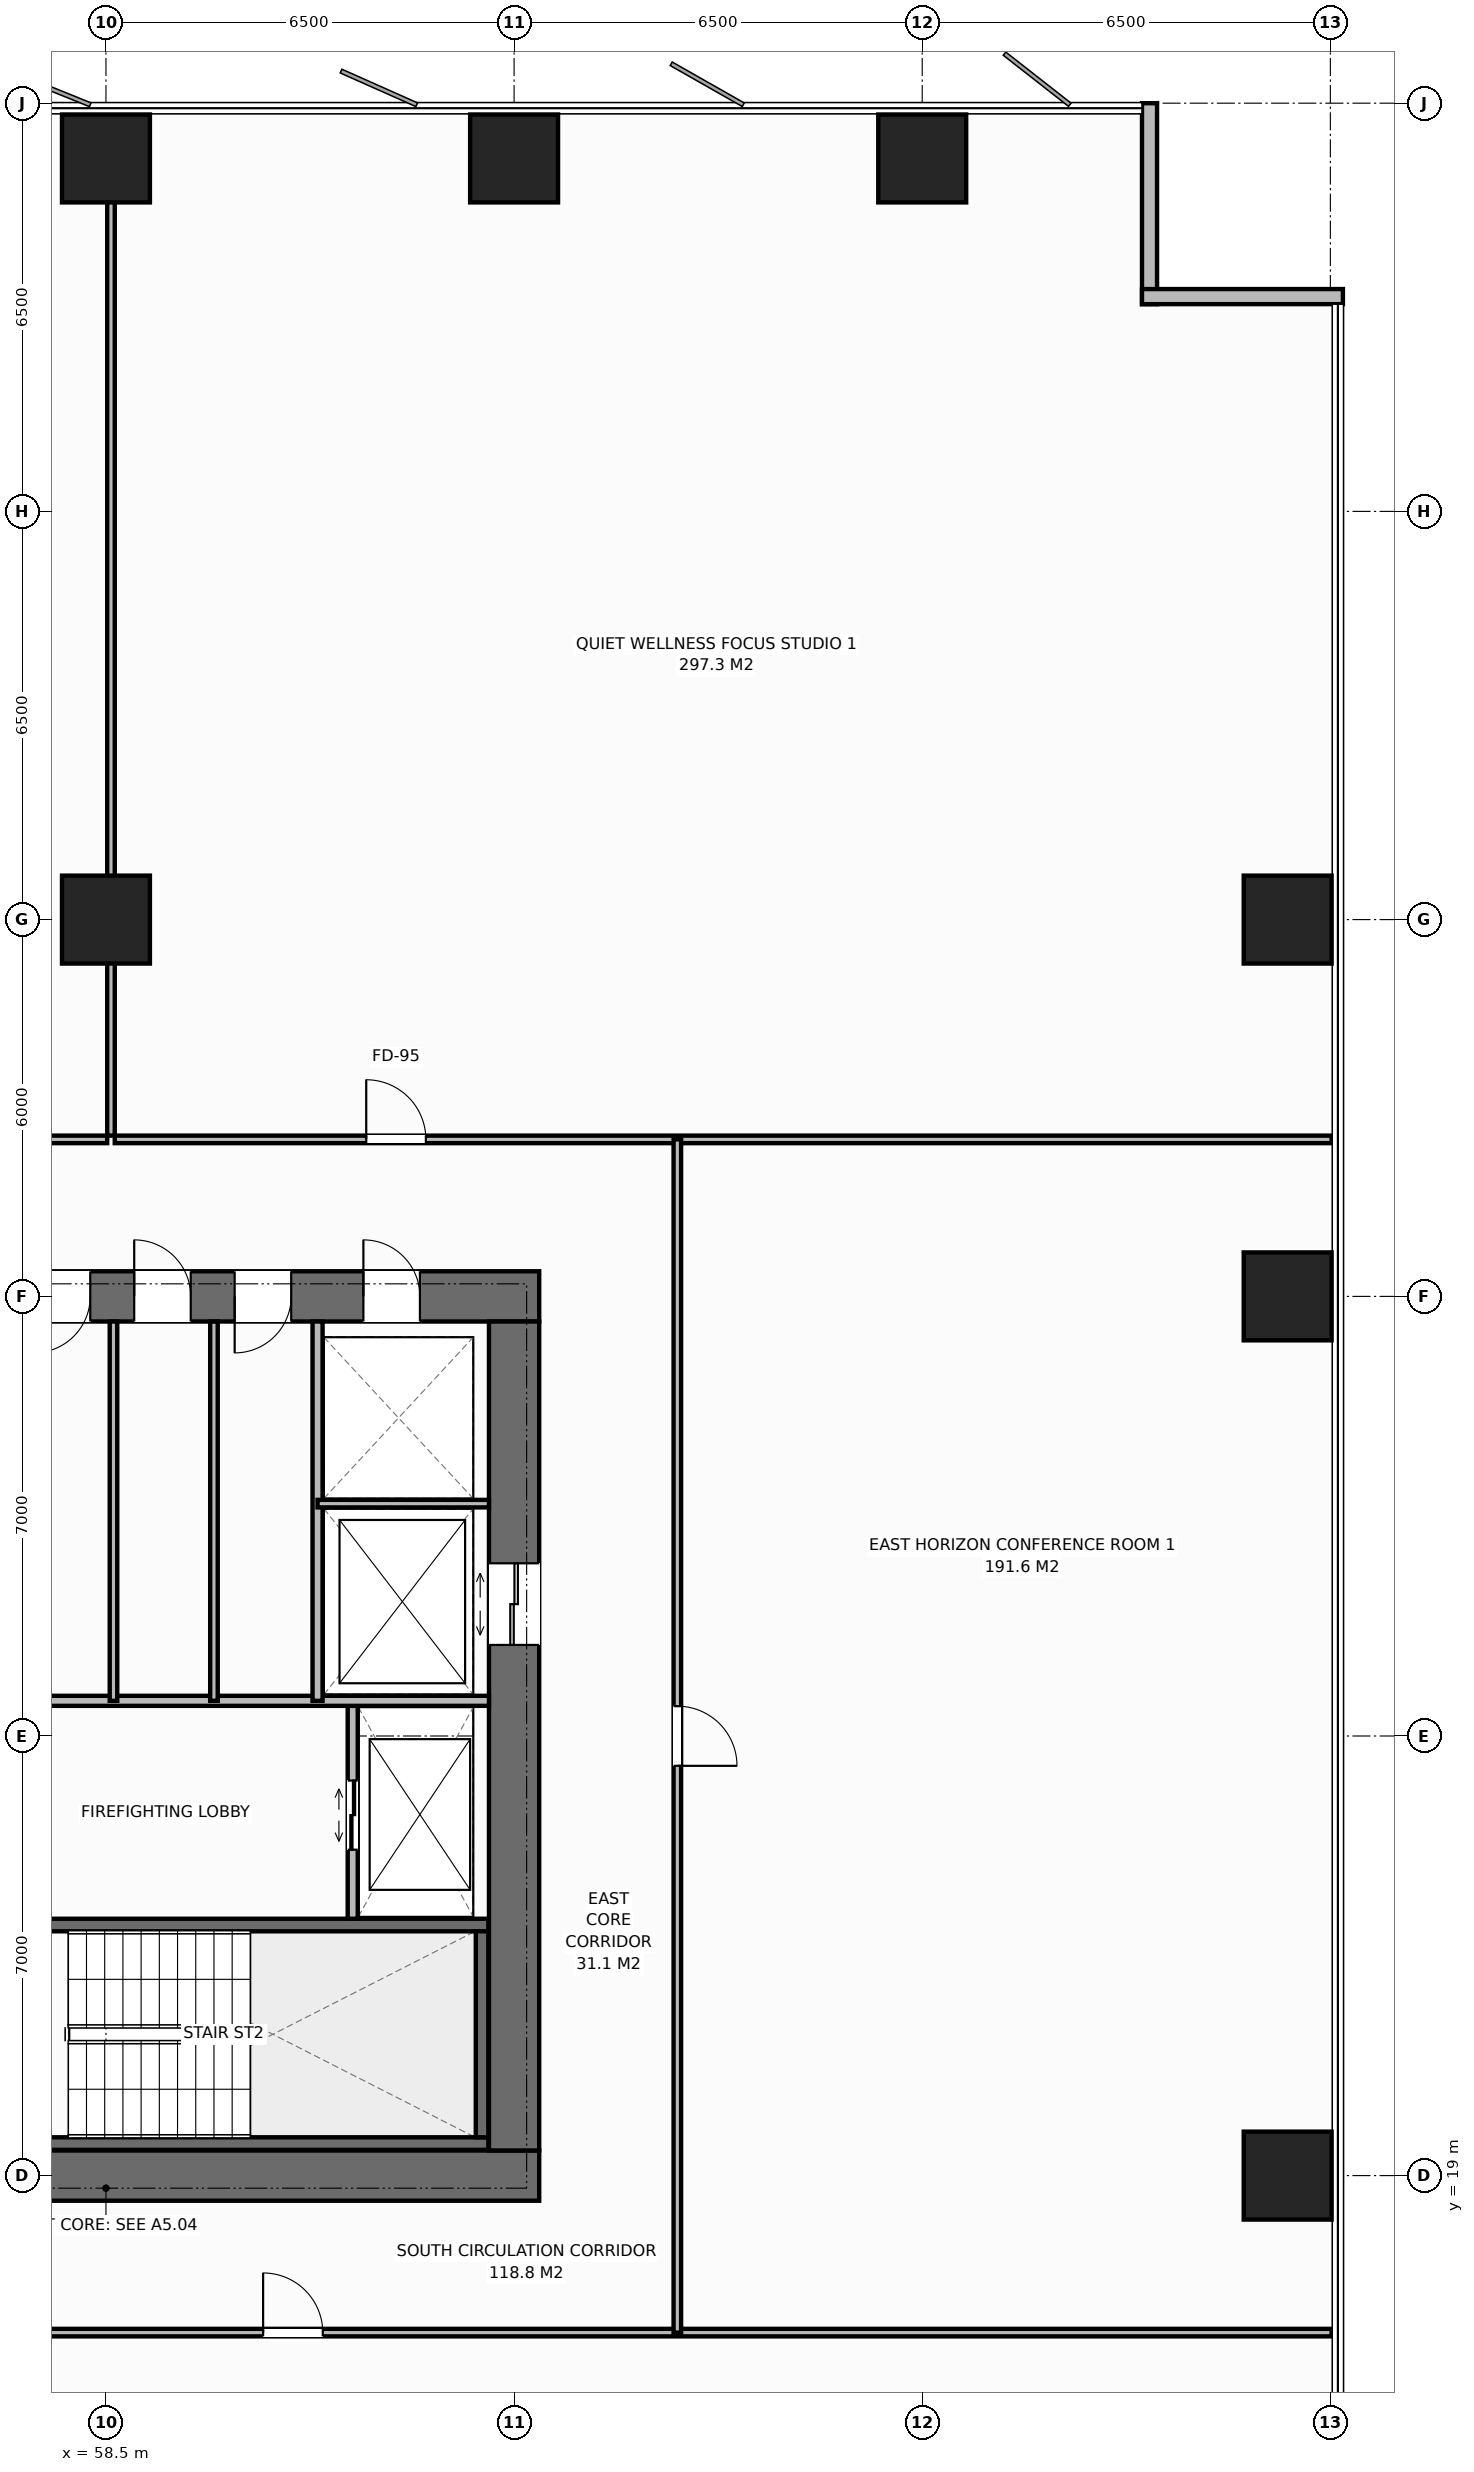
"""IFC4 building model, lengths in metres.
Left out: names, types, materials, properties, quantities, classifications, styles, units other than length and angle.
Written with IfcOpenShell. Run it as: python <this file> out.ifc"""

import sys

from ifc_helpers import new_model, si_unit, direction, frame, frame_2d, origin, origin_2d, place, context, subcontext, project, spatial, rectangle, extrude, element, fill, save


model = new_model("IFC4")
c1 = context("Model", 3, precision=1e-05, world=origin(), true_north=direction((0.0, 1.0)))
c2 = subcontext(c1, "Body", "Model", "MODEL_VIEW")
j1 = project(units=[si_unit("LENGTHUNIT", "METRE"), si_unit("PLANEANGLEUNIT", "RADIAN")], contexts=[c1])
p1 = place(None, origin())
s1 = spatial("IfcSite", under=j1, at=p1, CompositionType="ELEMENT")
p2 = place(p1, origin())
s2 = spatial("IfcBuilding", under=s1, at=p2, CompositionType="ELEMENT")
p3 = place(p2, frame((0.0, 0.0, 43.0)))
s3 = spatial("IfcBuildingStorey", under=s2, at=p3, CompositionType="ELEMENT", Elevation=43.0)
p4 = place(p3, frame((51.6, 19.0, 0.0), z_axis=(0.0, 0.0, 1.0), x_axis=(1.0, 0.0, 0.0)))
e1 = element("IfcWall", 1, at=p4, inside=s3, PredefinedType="SHEAR", context=c2, shape_type="SweptSolid", body=[
    extrude(rectangle(XDim=13.8, YDim=0.8, at=frame_2d((6.9, 0.0))), origin(), (0.0, 0.0, 1.0), 3.8),
])
p5 = place(p4, frame((3.12, 0.0, 0.0)))
e2 = element("IfcOpeningElement", 2, at=p5, cuts=e1, PredefinedType="OPENING", context=c2, shape_type="SweptSolid", body=[
    extrude(rectangle(XDim=1.4, YDim=2.2, at=frame_2d((0.7, 1.1))), frame((0.0, 0.41, 0.0), z_axis=(0.0, -1.0, 0.0), x_axis=(1.0, 0.0, 0.0)), (0.0, 0.0, 1.0), 0.82),
])
p6 = place(p3, frame((51.6, 33.0, 0.0), z_axis=(0.0, 0.0, 1.0), x_axis=(1.0, 0.0, 0.0)))
e3 = element("IfcWall", 3, at=p6, inside=s3, PredefinedType="SHEAR", context=c2, shape_type="SweptSolid", body=[
    extrude(rectangle(XDim=13.8, YDim=0.8, at=frame_2d((6.9, 0.0))), origin(), (0.0, 0.0, 1.0), 3.8),
])
p7 = place(p6, frame((3.12, 0.0, 0.0)))
e4 = element("IfcOpeningElement", 4, at=p7, cuts=e3, PredefinedType="OPENING", context=c2, shape_type="SweptSolid", body=[
    extrude(rectangle(XDim=1.4, YDim=2.2, at=frame_2d((0.7, 1.1))), frame((0.0, 0.41, 0.0), z_axis=(0.0, -1.0, 0.0), x_axis=(1.0, 0.0, 0.0)), (0.0, 0.0, 1.0), 0.82),
])
p8 = place(p6, frame((11.0, 0.0, 0.0)))
e5 = element("IfcOpeningElement", 5, at=p8, cuts=e3, PredefinedType="OPENING", context=c2, shape_type="SweptSolid", body=[
    extrude(rectangle(XDim=0.9, YDim=2.15, at=frame_2d((0.45, 1.075))), frame((0.0, 0.41, 0.0), z_axis=(0.0, -1.0, 0.0), x_axis=(1.0, 0.0, 0.0)), (0.0, 0.0, 1.0), 0.82),
])
p9 = place(p6, frame((5.75, 0.0, 0.0)))
e6 = element("IfcOpeningElement", 6, at=p9, cuts=e3, PredefinedType="OPENING", context=c2, shape_type="SweptSolid", body=[
    extrude(rectangle(XDim=0.9, YDim=2.15, at=frame_2d((0.45, 1.075))), frame((0.0, 0.41, 0.0), z_axis=(0.0, -1.0, 0.0), x_axis=(1.0, 0.0, 0.0)), (0.0, 0.0, 1.0), 0.82),
])
p10 = place(p6, frame((7.35, 0.0, 0.0)))
e7 = element("IfcOpeningElement", 7, at=p10, cuts=e3, PredefinedType="OPENING", context=c2, shape_type="SweptSolid", body=[
    extrude(rectangle(XDim=0.9, YDim=2.15, at=frame_2d((0.45, 1.075))), frame((0.0, 0.41, 0.0), z_axis=(0.0, -1.0, 0.0), x_axis=(1.0, 0.0, 0.0)), (0.0, 0.0, 1.0), 0.82),
])
p11 = place(p6, frame((8.95, 0.0, 0.0)))
e8 = element("IfcOpeningElement", 8, at=p11, cuts=e3, PredefinedType="OPENING", context=c2, shape_type="SweptSolid", body=[
    extrude(rectangle(XDim=0.9, YDim=2.15, at=frame_2d((0.45, 1.075))), frame((0.0, 0.41, 0.0), z_axis=(0.0, -1.0, 0.0), x_axis=(1.0, 0.0, 0.0)), (0.0, 0.0, 1.0), 0.82),
])
p12 = place(p3, frame((65.0, 19.4, 0.0), z_axis=(0.0, 0.0, 1.0), x_axis=(0.0, 1.0, 0.0)))
e9 = element("IfcWall", 9, at=p12, inside=s3, PredefinedType="SHEAR", context=c2, shape_type="SweptSolid", body=[
    extrude(rectangle(XDim=13.2, YDim=0.8, at=frame_2d((6.6, 0.0))), origin(), (0.0, 0.0, 1.0), 3.8),
])
p13 = place(p12, frame((8.05, 0.0, 0.0)))
e10 = element("IfcOpeningElement", 10, at=p13, cuts=e9, PredefinedType="OPENING", context=c2, shape_type="SweptSolid", body=[
    extrude(rectangle(XDim=1.3, YDim=2.2, at=frame_2d((0.65, 1.1))), frame((0.0, 0.41, 0.0), z_axis=(0.0, -1.0, 0.0), x_axis=(1.0, 0.0, 0.0)), (0.0, 0.0, 1.0), 0.82),
])
p14 = place(p3, frame((56.16, 19.51, 0.0), z_axis=(0.0, 0.0, 1.0), x_axis=(1.0, 0.0, 0.0)))
e11 = element("IfcWall", 11, at=p14, inside=s3, PredefinedType="SHEAR", context=c2, shape_type="SweptSolid", body=[
    extrude(rectangle(XDim=8.43, YDim=0.2, at=frame_2d((4.215, 0.0))), origin(), (0.0, 0.0, 1.0), 3.8),
])
p15 = place(p3, frame((56.16, 22.99, 0.0), z_axis=(0.0, 0.0, 1.0), x_axis=(1.0, 0.0, 0.0)))
e12 = element("IfcWall", 12, at=p15, inside=s3, PredefinedType="SHEAR", context=c2, shape_type="SweptSolid", body=[
    extrude(rectangle(XDim=8.43, YDim=0.2, at=frame_2d((4.215, 0.0))), origin(), (0.0, 0.0, 1.0), 3.8),
])
p16 = place(p15, frame((0.45, 0.0, 0.0)))
e13 = element("IfcOpeningElement", 13, at=p16, cuts=e12, PredefinedType="OPENING", context=c2, shape_type="SweptSolid", body=[
    extrude(rectangle(XDim=1.0, YDim=2.15, at=frame_2d((0.5, 1.075))), frame((0.0, 0.11, 0.0), z_axis=(0.0, -1.0, 0.0), x_axis=(1.0, 0.0, 0.0)), (0.0, 0.0, 1.0), 0.22),
])
p17 = place(p3, frame((64.49, 19.61, 0.0), z_axis=(0.0, 0.0, 1.0), x_axis=(0.0, 1.0, 0.0)))
e14 = element("IfcWall", 14, at=p17, inside=s3, PredefinedType="SHEAR", context=c2, shape_type="SweptSolid", body=[
    extrude(rectangle(XDim=3.28, YDim=0.2, at=frame_2d((1.64, 0.0))), origin(), (0.0, 0.0, 1.0), 3.8),
])
for number, where, z_axis, x_axis in (
    (15, (58.5, 39.0, 0.0), (0.0, 0.0, 1.0), (1.0, 0.0, 0.0)),
    (16, (58.5, 51.12, 0.0), (0.0, 0.0, 1.0), (1.0, 0.0, 0.0)),
    (17, (65.0, 51.12, 0.0), (0.0, 0.0, 1.0), (1.0, 0.0, 0.0)),
    (18, (71.5, 51.12, 0.0), (0.0, 0.0, 1.0), (1.0, 0.0, 0.0)),
    (19, (77.32, 19.0, 0.0), (0.0, 0.0, 1.0), (1.0, 0.0, 0.0)),
    (20, (77.32, 33.0, 0.0), (0.0, 0.0, 1.0), (1.0, 0.0, 0.0)),
    (21, (77.32, 39.0, 0.0), (0.0, 0.0, 1.0), (1.0, 0.0, 0.0)),
):
    element("IfcColumn", number, at=place(p3, frame(where, z_axis=z_axis, x_axis=x_axis)), inside=s3, PredefinedType="COLUMN", context=c2, shape_type="SweptSolid", body=[
        extrude(rectangle(XDim=1.4, YDim=1.4, at=origin_2d()), origin(), (0.0, 0.0, 1.0), 3.8),
    ])
for number, where, z_axis, x_axis in (
    (22, (75.12, 52.0, 0.0), (0.0, 0.0, 1.0), (0.0, -1.0, 0.0)),
    (23, (75.0, 48.92, 0.0), (0.0, 0.0, 1.0), (1.0, 0.0, 0.0)),
):
    element("IfcWall", number, at=place(p3, frame(where, z_axis=z_axis, x_axis=x_axis)), inside=s3, PredefinedType="STANDARD", context=c2, shape_type="SweptSolid", body=[
        extrude(rectangle(XDim=3.2, YDim=0.24, at=frame_2d((1.6, 0.0))), origin(), (0.0, 0.0, 1.0), 3.55),
    ])
p18 = place(p3, frame((62.43, 23.09, 0.0), z_axis=(0.0, 0.0, 1.0), x_axis=(0.0, 1.0, 0.0)))
e24 = element("IfcWall", 24, at=p18, inside=s3, PredefinedType="STANDARD", context=c2, shape_type="SweptSolid", body=[
    extrude(rectangle(XDim=3.47, YDim=0.16, at=frame_2d((1.735, 0.0))), origin(), (0.0, 0.0, 1.0), 3.55),
])
p19 = place(p18, frame((1.1, 0.0, 0.0)))
e25 = element("IfcOpeningElement", 25, at=p19, cuts=e24, PredefinedType="OPENING", context=c2, shape_type="SweptSolid", body=[
    extrude(rectangle(XDim=1.1, YDim=2.2, at=frame_2d((0.55, 1.1))), frame((0.0, 0.09, 0.0), z_axis=(0.0, -1.0, 0.0), x_axis=(1.0, 0.0, 0.0)), (0.0, 0.0, 1.0), 0.18),
])
p20 = place(p3, frame((56.26, 26.56, 0.0), z_axis=(0.0, 0.0, 1.0), x_axis=(1.0, 0.0, 0.0)))
e26 = element("IfcWall", 26, at=p20, inside=s3, PredefinedType="STANDARD", context=c2, shape_type="SweptSolid", body=[
    extrude(rectangle(XDim=8.34, YDim=0.16, at=frame_2d((4.17, 0.0))), origin(), (0.0, 0.0, 1.0), 3.55),
])
p21 = place(p3, frame((61.87, 26.56, 0.0), z_axis=(0.0, 0.0, 1.0), x_axis=(0.0, 1.0, 0.0)))
e27 = element("IfcWall", 27, at=p21, inside=s3, PredefinedType="STANDARD", context=c2, shape_type="SweptSolid", body=[
    extrude(rectangle(XDim=6.04, YDim=0.16, at=frame_2d((3.02, 0.0))), origin(), (0.0, 0.0, 1.0), 3.55),
])
p22 = place(p3, frame((61.87, 29.7, 0.0), z_axis=(0.0, 0.0, 1.0), x_axis=(1.0, 0.0, 0.0)))
e28 = element("IfcWall", 28, at=p22, inside=s3, PredefinedType="PARTITIONING", context=c2, shape_type="SweptSolid", body=[
    extrude(rectangle(XDim=2.73, YDim=0.12, at=frame_2d((1.365, 0.0))), origin(), (0.0, 0.0, 1.0), 3.55),
])
for number, where, z_axis, x_axis in (
    (29, (58.62, 26.56, 0.0), (0.0, 0.0, 1.0), (0.0, 1.0, 0.0)),
    (30, (60.22, 26.56, 0.0), (0.0, 0.0, 1.0), (0.0, 1.0, 0.0)),
):
    element("IfcWall", number, at=place(p3, frame(where, z_axis=z_axis, x_axis=x_axis)), inside=s3, PredefinedType="PARTITIONING", context=c2, shape_type="SweptSolid", body=[
        extrude(rectangle(XDim=6.04, YDim=0.12, at=frame_2d((3.02, 0.0))), origin(), (0.0, 0.0, 1.0), 3.55),
    ])
p23 = place(p3, frame((58.58, 35.56, 0.0), z_axis=(0.0, 0.0, 1.0), x_axis=(0.0, 1.0, 0.0)))
e31 = element("IfcWall", 31, at=p23, inside=s3, PredefinedType="PARTITIONING", context=c2, shape_type="SweptSolid", body=[
    extrude(rectangle(XDim=16.42, YDim=0.12, at=frame_2d((8.21, 0.0))), origin(), (0.0, 0.0, 1.0), 2.9),
])
p24 = place(p3, frame((35.462, 35.5, 0.0), z_axis=(0.0, 0.0, 1.0), x_axis=(1.0, 0.0, 0.0)))
e32 = element("IfcWall", 32, at=p24, inside=s3, PredefinedType="PARTITIONING", context=c2, shape_type="SweptSolid", body=[
    extrude(rectangle(XDim=23.058, YDim=0.12, at=frame_2d((11.529, 0.0))), origin(), (0.0, 0.0, 1.0), 3.55),
])
p25 = place(p24, frame((11.054, 0.0, 0.0)))
e33 = element("IfcOpeningElement", 33, at=p25, cuts=e32, PredefinedType="OPENING", context=c2, shape_type="SweptSolid", body=[
    extrude(rectangle(XDim=0.95, YDim=2.15, at=frame_2d((0.475, 1.075))), frame((0.0, 0.07, 0.0), z_axis=(0.0, -1.0, 0.0), x_axis=(1.0, 0.0, 0.0)), (0.0, 0.0, 1.0), 0.14),
])
p26 = place(p3, frame((58.64, 35.5, 0.0), z_axis=(0.0, 0.0, 1.0), x_axis=(1.0, 0.0, 0.0)))
e34 = element("IfcWall", 34, at=p26, inside=s3, PredefinedType="PARTITIONING", context=c2, shape_type="SweptSolid", body=[
    extrude(rectangle(XDim=19.38, YDim=0.12, at=frame_2d((9.69, 0.0))), origin(), (0.0, 0.0, 1.0), 3.55),
])
p27 = place(p26, frame((4.005, 0.0, 0.0)))
e35 = element("IfcOpeningElement", 35, at=p27, cuts=e34, PredefinedType="OPENING", context=c2, shape_type="SweptSolid", body=[
    extrude(rectangle(XDim=0.95, YDim=2.15, at=frame_2d((0.475, 1.075))), frame((0.0, 0.07, 0.0), z_axis=(0.0, -1.0, 0.0), x_axis=(1.0, 0.0, 0.0)), (0.0, 0.0, 1.0), 0.14),
])
p28 = place(p3, frame((55.356, 16.5, 0.0), z_axis=(0.0, 0.0, 1.0), x_axis=(1.0, 0.0, 0.0)))
e36 = element("IfcWall", 36, at=p28, inside=s3, PredefinedType="PARTITIONING", context=c2, shape_type="SweptSolid", body=[
    extrude(rectangle(XDim=22.664, YDim=0.12, at=frame_2d((11.332, 0.0))), origin(), (0.0, 0.0, 1.0), 3.55),
])
p29 = place(p28, frame((5.647, 0.0, 0.0)))
e37 = element("IfcOpeningElement", 37, at=p29, cuts=e36, PredefinedType="OPENING", context=c2, shape_type="SweptSolid", body=[
    extrude(rectangle(XDim=0.95, YDim=2.15, at=frame_2d((0.475, 1.075))), frame((0.0, 0.07, 0.0), z_axis=(0.0, -1.0, 0.0), x_axis=(1.0, 0.0, 0.0)), (0.0, 0.0, 1.0), 0.14),
])
p30 = place(p3, frame((67.6, 16.5, 0.0), z_axis=(0.0, 0.0, 1.0), x_axis=(0.0, 1.0, 0.0)))
e38 = element("IfcWall", 38, at=p30, inside=s3, PredefinedType="PARTITIONING", context=c2, shape_type="SweptSolid", body=[
    extrude(rectangle(XDim=19.0, YDim=0.12, at=frame_2d((9.5, 0.0))), origin(), (0.0, 0.0, 1.0), 3.55),
])
p31 = place(p30, frame((9.025, 0.0, 0.0)))
e39 = element("IfcOpeningElement", 39, at=p31, cuts=e38, PredefinedType="OPENING", context=c2, shape_type="SweptSolid", body=[
    extrude(rectangle(XDim=0.95, YDim=2.15, at=frame_2d((0.475, 1.075))), frame((0.0, 0.07, 0.0), z_axis=(0.0, -1.0, 0.0), x_axis=(1.0, 0.0, 0.0)), (0.0, 0.0, 1.0), 0.14),
])
p32 = place(p19, origin())
e40 = element("IfcDoor", 40, at=p32, inside=s3, OperationType="DOUBLE_DOOR_SLIDING", PredefinedType="DOOR", context=c2, shape_type="SweptSolid", body=[
    extrude(rectangle(XDim=1.1, YDim=2.2, at=frame_2d((0.55, 1.1))), frame((0.0, 0.025, 0.0), z_axis=(0.0, -1.0, 0.0), x_axis=(1.0, 0.0, 0.0)), (0.0, 0.0, 1.0), 0.05),
])
fill(e25, e40)
p33 = place(p13, origin())
e41 = element("IfcDoor", 41, at=p33, inside=s3, OperationType="DOUBLE_DOOR_SLIDING", PredefinedType="DOOR", context=c2, shape_type="SweptSolid", body=[
    extrude(rectangle(XDim=1.3, YDim=2.2, at=frame_2d((0.65, 1.1))), frame((0.0, 0.025, 0.0), z_axis=(0.0, -1.0, 0.0), x_axis=(1.0, 0.0, 0.0)), (0.0, 0.0, 1.0), 0.05),
])
fill(e10, e41)
p34 = place(p8, origin())
e42 = element("IfcDoor", 42, at=p34, inside=s3, OperationType="SINGLE_SWING_LEFT", PredefinedType="DOOR", context=c2, shape_type="SweptSolid", body=[
    extrude(rectangle(XDim=0.9, YDim=2.15, at=frame_2d((0.45, 1.075))), frame((0.0, -0.075, 0.0), z_axis=(0.0, -1.0, 0.0), x_axis=(1.0, 0.0, 0.0)), (0.0, 0.0, 1.0), 0.05),
])
fill(e5, e42)
p35 = place(p9, origin())
e43 = element("IfcDoor", 43, at=p35, inside=s3, OperationType="SINGLE_SWING_RIGHT", PredefinedType="DOOR", context=c2, shape_type="SweptSolid", body=[
    extrude(rectangle(XDim=0.9, YDim=2.15, at=frame_2d((0.45, 1.075))), frame((0.0, -0.075, 0.0), z_axis=(0.0, -1.0, 0.0), x_axis=(1.0, 0.0, 0.0)), (0.0, 0.0, 1.0), 0.05),
])
fill(e6, e43)
p36 = place(p10, origin())
e44 = element("IfcDoor", 44, at=p36, inside=s3, OperationType="SINGLE_SWING_LEFT", PredefinedType="DOOR", context=c2, shape_type="SweptSolid", body=[
    extrude(rectangle(XDim=0.9, YDim=2.15, at=frame_2d((0.45, 1.075))), frame((0.0, -0.075, 0.0), z_axis=(0.0, -1.0, 0.0), x_axis=(1.0, 0.0, 0.0)), (0.0, 0.0, 1.0), 0.05),
])
fill(e7, e44)
p37 = place(p11, origin())
e45 = element("IfcDoor", 45, at=p37, inside=s3, OperationType="SINGLE_SWING_RIGHT", PredefinedType="DOOR", context=c2, shape_type="SweptSolid", body=[
    extrude(rectangle(XDim=0.9, YDim=2.15, at=frame_2d((0.45, 1.075))), frame((0.0, -0.075, 0.0), z_axis=(0.0, -1.0, 0.0), x_axis=(1.0, 0.0, 0.0)), (0.0, 0.0, 1.0), 0.05),
])
fill(e8, e45)
p38 = place(p27, origin())
e46 = element("IfcDoor", 46, at=p38, inside=s3, OperationType="SINGLE_SWING_LEFT", PredefinedType="DOOR", context=c2, shape_type="SweptSolid", body=[
    extrude(rectangle(XDim=0.95, YDim=2.15, at=frame_2d((0.475, 1.075))), frame((0.0, 0.025, 0.0), z_axis=(0.0, -1.0, 0.0), x_axis=(1.0, 0.0, 0.0)), (0.0, 0.0, 1.0), 0.05),
])
fill(e35, e46)
p39 = place(p29, origin())
e47 = element("IfcDoor", 47, at=p39, inside=s3, OperationType="SINGLE_SWING_LEFT", PredefinedType="DOOR", context=c2, shape_type="SweptSolid", body=[
    extrude(rectangle(XDim=0.95, YDim=2.15, at=frame_2d((0.475, 1.075))), frame((0.0, 0.025, 0.0), z_axis=(0.0, -1.0, 0.0), x_axis=(1.0, 0.0, 0.0)), (0.0, 0.0, 1.0), 0.05),
])
fill(e37, e47)
p40 = place(p31, origin())
e48 = element("IfcDoor", 48, at=p40, inside=s3, OperationType="SINGLE_SWING_RIGHT", PredefinedType="DOOR", context=c2, shape_type="SweptSolid", body=[
    extrude(rectangle(XDim=0.95, YDim=2.15, at=frame_2d((0.475, 1.075))), frame((0.0, 0.025, 0.0), z_axis=(0.0, -1.0, 0.0), x_axis=(1.0, 0.0, 0.0)), (0.0, 0.0, 1.0), 0.05),
])
fill(e39, e48)
save(model, sys.argv[1])
